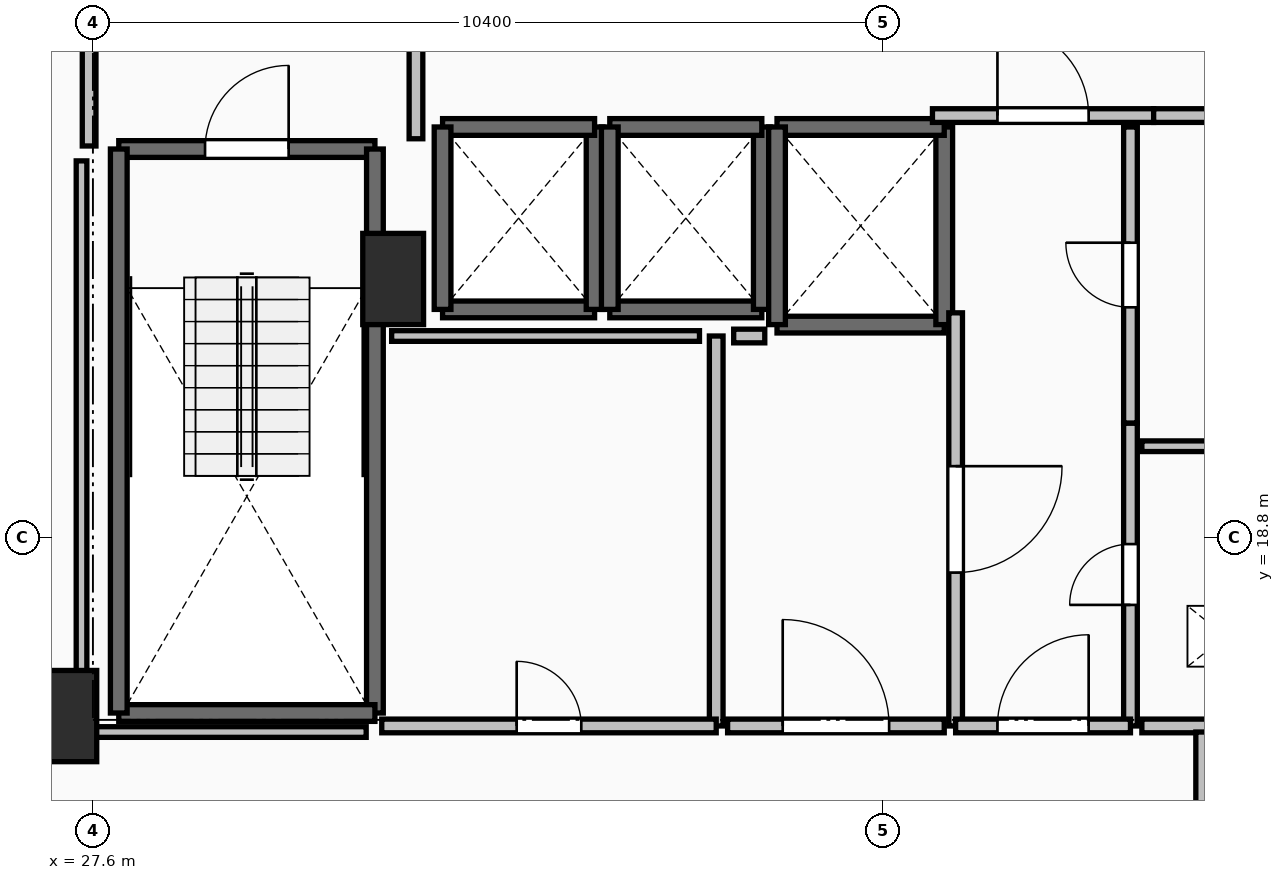
"""IFC4 building model, lengths in metres.
Left out: names, types, materials, properties, quantities, classifications, styles, units other than length and angle.
Written with IfcOpenShell. Run it as: python <this file> out.ifc"""

import sys

from ifc_helpers import new_model, si_unit, direction, frame, frame_2d, origin, origin_2d, place, context, subcontext, project, spatial, rectangle, extrude, element, fill, save


model = new_model("IFC4")
c1 = context("Model", 3, precision=1e-05, world=origin(), true_north=direction((0.0, 1.0)))
c2 = subcontext(c1, "Body", "Model", "MODEL_VIEW")
j1 = project(units=[si_unit("LENGTHUNIT", "METRE"), si_unit("PLANEANGLEUNIT", "RADIAN")], contexts=[c1])
p1 = place(None, origin())
s1 = spatial("IfcSite", under=j1, at=p1, CompositionType="ELEMENT")
p2 = place(p1, origin())
s2 = spatial("IfcBuilding", under=s1, at=p2, CompositionType="ELEMENT")
p3 = place(p2, frame((0.0, 0.0, 78.8)))
s3 = spatial("IfcBuildingStorey", under=s2, at=p3, CompositionType="ELEMENT", Elevation=78.8)
for number, where, z_axis, x_axis in (
    (1, (27.25, 16.45, 0.0), (0.0, 0.0, 1.0), (1.0, 0.0, 0.0)),
    (2, (31.55, 22.2, 0.0), (0.0, 0.0, 1.0), (1.0, 0.0, 0.0)),
):
    element("IfcColumn", number, at=place(p3, frame(where, z_axis=z_axis, x_axis=x_axis)), inside=s3, PredefinedType="PILASTER", context=c2, shape_type="SweptSolid", body=[
        extrude(rectangle(XDim=0.8, YDim=1.2, at=origin_2d()), origin(), (0.0, 0.0, 1.0), 3.5),
    ])
p4 = place(p3, frame((27.94, 23.91, 0.0), z_axis=(0.0, 0.0, 1.0), x_axis=(1.0, 0.0, 0.0)))
e3 = element("IfcWall", 3, at=p4, inside=s3, PredefinedType="SOLIDWALL", context=c2, shape_type="SweptSolid", body=[
    extrude(rectangle(XDim=3.37, YDim=0.22, at=frame_2d((1.685, 0.0))), origin(), (0.0, 0.0, 1.0), 3.24),
])
p5 = place(p4, frame((1.135, 0.0, 0.0)))
e4 = element("IfcOpeningElement", 4, at=p5, cuts=e3, PredefinedType="OPENING", context=c2, shape_type="SweptSolid", body=[
    extrude(rectangle(XDim=1.1, YDim=2.15, at=frame_2d((0.55, 1.075))), frame((0.0, 0.125, 0.0), z_axis=(0.0, -1.0, 0.0), x_axis=(1.0, 0.0, 0.0)), (0.0, 0.0, 1.0), 0.25),
])
p6 = place(p3, frame((31.31, 23.91, 0.0), z_axis=(0.0, 0.0, 1.0), x_axis=(0.0, -1.0, 0.0)))
e5 = element("IfcWall", 5, at=p6, inside=s3, PredefinedType="SOLIDWALL", context=c2, shape_type="SweptSolid", body=[
    extrude(rectangle(XDim=7.42, YDim=0.22, at=frame_2d((3.71, 0.0))), origin(), (0.0, 0.0, 1.0), 3.24),
])
p7 = place(p3, frame((31.31, 16.49, 0.0), z_axis=(0.0, 0.0, 1.0), x_axis=(-1.0, 0.0, 0.0)))
e6 = element("IfcWall", 6, at=p7, inside=s3, PredefinedType="SOLIDWALL", context=c2, shape_type="SweptSolid", body=[
    extrude(rectangle(XDim=3.37, YDim=0.22, at=frame_2d((1.685, 0.0))), origin(), (0.0, 0.0, 1.0), 3.24),
])
p8 = place(p3, frame((27.94, 16.49, 0.0), z_axis=(0.0, 0.0, 1.0), x_axis=(0.0, 1.0, 0.0)))
e7 = element("IfcWall", 7, at=p8, inside=s3, PredefinedType="SOLIDWALL", context=c2, shape_type="SweptSolid", body=[
    extrude(rectangle(XDim=7.42, YDim=0.22, at=frame_2d((3.71, 0.0))), origin(), (0.0, 0.0, 1.0), 3.24),
])
p9 = place(p3, frame((32.2, 21.8, 0.0), z_axis=(0.0, 0.0, 1.0), x_axis=(1.0, 0.0, 0.0)))
e8 = element("IfcWall", 8, at=p9, inside=s3, PredefinedType="SOLIDWALL", context=c2, shape_type="SweptSolid", body=[
    extrude(rectangle(XDim=2.0, YDim=0.22, at=frame_2d((1.0, 0.0))), origin(), (0.0, 0.0, 1.0), 3.24),
])
p10 = place(p3, frame((34.2, 21.8, 0.0), z_axis=(0.0, 0.0, 1.0), x_axis=(0.0, 1.0, 0.0)))
e9 = element("IfcWall", 9, at=p10, inside=s3, PredefinedType="SOLIDWALL", context=c2, shape_type="SweptSolid", body=[
    extrude(rectangle(XDim=2.4, YDim=0.22, at=frame_2d((1.2, 0.0))), origin(), (0.0, 0.0, 1.0), 3.24),
])
p11 = place(p3, frame((34.2, 24.2, 0.0), z_axis=(0.0, 0.0, 1.0), x_axis=(-1.0, 0.0, 0.0)))
e10 = element("IfcWall", 10, at=p11, inside=s3, PredefinedType="SOLIDWALL", context=c2, shape_type="SweptSolid", body=[
    extrude(rectangle(XDim=2.0, YDim=0.22, at=frame_2d((1.0, 0.0))), origin(), (0.0, 0.0, 1.0), 3.24),
])
p12 = place(p3, frame((32.2, 24.2, 0.0), z_axis=(0.0, 0.0, 1.0), x_axis=(0.0, -1.0, 0.0)))
e11 = element("IfcWall", 11, at=p12, inside=s3, PredefinedType="SOLIDWALL", context=c2, shape_type="SweptSolid", body=[
    extrude(rectangle(XDim=2.4, YDim=0.22, at=frame_2d((1.2, 0.0))), origin(), (0.0, 0.0, 1.0), 3.24),
])
p13 = place(p3, frame((34.4, 21.8, 0.0), z_axis=(0.0, 0.0, 1.0), x_axis=(1.0, 0.0, 0.0)))
e12 = element("IfcWall", 12, at=p13, inside=s3, PredefinedType="SOLIDWALL", context=c2, shape_type="SweptSolid", body=[
    extrude(rectangle(XDim=2.0, YDim=0.22, at=frame_2d((1.0, 0.0))), origin(), (0.0, 0.0, 1.0), 3.24),
])
p14 = place(p3, frame((36.4, 21.8, 0.0), z_axis=(0.0, 0.0, 1.0), x_axis=(0.0, 1.0, 0.0)))
e13 = element("IfcWall", 13, at=p14, inside=s3, PredefinedType="SOLIDWALL", context=c2, shape_type="SweptSolid", body=[
    extrude(rectangle(XDim=2.4, YDim=0.22, at=frame_2d((1.2, 0.0))), origin(), (0.0, 0.0, 1.0), 3.24),
])
p15 = place(p3, frame((36.4, 24.2, 0.0), z_axis=(0.0, 0.0, 1.0), x_axis=(-1.0, 0.0, 0.0)))
e14 = element("IfcWall", 14, at=p15, inside=s3, PredefinedType="SOLIDWALL", context=c2, shape_type="SweptSolid", body=[
    extrude(rectangle(XDim=2.0, YDim=0.22, at=frame_2d((1.0, 0.0))), origin(), (0.0, 0.0, 1.0), 3.24),
])
p16 = place(p3, frame((34.4, 24.2, 0.0), z_axis=(0.0, 0.0, 1.0), x_axis=(0.0, -1.0, 0.0)))
e15 = element("IfcWall", 15, at=p16, inside=s3, PredefinedType="SOLIDWALL", context=c2, shape_type="SweptSolid", body=[
    extrude(rectangle(XDim=2.4, YDim=0.22, at=frame_2d((1.2, 0.0))), origin(), (0.0, 0.0, 1.0), 3.24),
])
p17 = place(p3, frame((36.6, 21.6, 0.0), z_axis=(0.0, 0.0, 1.0), x_axis=(1.0, 0.0, 0.0)))
e16 = element("IfcWall", 16, at=p17, inside=s3, PredefinedType="SOLIDWALL", context=c2, shape_type="SweptSolid", body=[
    extrude(rectangle(XDim=2.2, YDim=0.22, at=frame_2d((1.1, 0.0))), origin(), (0.0, 0.0, 1.0), 3.24),
])
p18 = place(p3, frame((38.8, 21.6, 0.0), z_axis=(0.0, 0.0, 1.0), x_axis=(0.0, 1.0, 0.0)))
e17 = element("IfcWall", 17, at=p18, inside=s3, PredefinedType="SOLIDWALL", context=c2, shape_type="SweptSolid", body=[
    extrude(rectangle(XDim=2.6, YDim=0.22, at=frame_2d((1.3, 0.0))), origin(), (0.0, 0.0, 1.0), 3.24),
])
p19 = place(p3, frame((38.8, 24.2, 0.0), z_axis=(0.0, 0.0, 1.0), x_axis=(-1.0, 0.0, 0.0)))
e18 = element("IfcWall", 18, at=p19, inside=s3, PredefinedType="SOLIDWALL", context=c2, shape_type="SweptSolid", body=[
    extrude(rectangle(XDim=2.2, YDim=0.22, at=frame_2d((1.1, 0.0))), origin(), (0.0, 0.0, 1.0), 3.24),
])
p20 = place(p3, frame((36.6, 24.2, 0.0), z_axis=(0.0, 0.0, 1.0), x_axis=(0.0, -1.0, 0.0)))
e19 = element("IfcWall", 19, at=p20, inside=s3, PredefinedType="SOLIDWALL", context=c2, shape_type="SweptSolid", body=[
    extrude(rectangle(XDim=2.6, YDim=0.22, at=frame_2d((1.3, 0.0))), origin(), (0.0, 0.0, 1.0), 3.24),
])
p21 = place(p3, frame((31.85, 24.045, 0.0), z_axis=(0.0, 0.0, 1.0), x_axis=(0.0, 1.0, 0.0)))
e20 = element("IfcWall", 20, at=p21, inside=s3, PredefinedType="PARTITIONING", context=c2, shape_type="SweptSolid", body=[
    extrude(rectangle(XDim=3.91, YDim=0.18, at=frame_2d((1.955, 0.0))), origin(), (0.0, 0.0, 1.0), 3.24),
])
p22 = place(p21, frame((1.355, 0.0, 0.0)))
e21 = element("IfcOpeningElement", 21, at=p22, cuts=e20, PredefinedType="OPENING", context=c2, shape_type="SweptSolid", body=[
    extrude(rectangle(XDim=1.2, YDim=2.15, at=frame_2d((0.6, 1.075))), frame((0.0, 0.105, 0.0), z_axis=(0.0, -1.0, 0.0), x_axis=(1.0, 0.0, 0.0)), (0.0, 0.0, 1.0), 0.21),
])
p23 = place(p3, frame((27.55, 28.0, 0.0), z_axis=(0.0, 0.0, 1.0), x_axis=(0.0, -1.0, 0.0)))
e22 = element("IfcWall", 22, at=p23, inside=s3, PredefinedType="PARTITIONING", context=c2, shape_type="SweptSolid", body=[
    extrude(rectangle(XDim=4.05, YDim=0.18, at=frame_2d((2.025, 0.0))), origin(), (0.0, 0.0, 1.0), 3.24),
])
p24 = place(p23, frame((1.425, 0.0, 0.0)))
e23 = element("IfcOpeningElement", 23, at=p24, cuts=e22, PredefinedType="OPENING", context=c2, shape_type="SweptSolid", body=[
    extrude(rectangle(XDim=1.2, YDim=2.15, at=frame_2d((0.6, 1.075))), frame((0.0, 0.105, 0.0), z_axis=(0.0, -1.0, 0.0), x_axis=(1.0, 0.0, 0.0)), (0.0, 0.0, 1.0), 0.21),
])
p25 = place(p3, frame((38.645, 24.35, 0.0), z_axis=(0.0, 0.0, 1.0), x_axis=(1.0, 0.0, 0.0)))
e24 = element("IfcWall", 24, at=p25, inside=s3, PredefinedType="PARTITIONING", context=c2, shape_type="SweptSolid", body=[
    extrude(rectangle(XDim=2.91, YDim=0.18, at=frame_2d((1.455, 0.0))), origin(), (0.0, 0.0, 1.0), 3.24),
])
p26 = place(p25, frame((0.855, 0.0, 0.0)))
e25 = element("IfcOpeningElement", 25, at=p26, cuts=e24, PredefinedType="OPENING", context=c2, shape_type="SweptSolid", body=[
    extrude(rectangle(XDim=1.2, YDim=2.15, at=frame_2d((0.6, 1.075))), frame((0.0, 0.105, 0.0), z_axis=(0.0, -1.0, 0.0), x_axis=(1.0, 0.0, 0.0)), (0.0, 0.0, 1.0), 0.21),
])
p27 = place(p3, frame((41.555, 24.35, 0.0), z_axis=(0.0, 0.0, 1.0), x_axis=(1.0, 0.0, 0.0)))
e26 = element("IfcWall", 26, at=p27, inside=s3, PredefinedType="PARTITIONING", context=c2, shape_type="SweptSolid", body=[
    extrude(rectangle(XDim=2.445, YDim=0.18, at=frame_2d((1.223, 0.0))), origin(), (0.0, 0.0, 1.0), 3.24),
])
p28 = place(p27, frame((0.798, 0.0, 0.0)))
e27 = element("IfcOpeningElement", 27, at=p28, cuts=e26, PredefinedType="OPENING", context=c2, shape_type="SweptSolid", body=[
    extrude(rectangle(XDim=0.85, YDim=2.1, at=frame_2d((0.425, 1.05))), frame((0.0, 0.105, 0.0), z_axis=(0.0, -1.0, 0.0), x_axis=(1.0, 0.0, 0.0)), (0.0, 0.0, 1.0), 0.21),
])
p29 = place(p3, frame((41.25, 16.32, 0.0), z_axis=(0.0, 0.0, 1.0), x_axis=(0.0, 1.0, 0.0)))
e28 = element("IfcWall", 28, at=p29, inside=s3, PredefinedType="PARTITIONING", context=c2, shape_type="SweptSolid", body=[
    extrude(rectangle(XDim=3.985, YDim=0.18, at=frame_2d((1.992, 0.0))), origin(), (0.0, 0.0, 1.0), 3.24),
])
p30 = place(p29, frame((1.593, 0.0, 0.0)))
e29 = element("IfcOpeningElement", 29, at=p30, cuts=e28, PredefinedType="OPENING", context=c2, shape_type="SweptSolid", body=[
    extrude(rectangle(XDim=0.8, YDim=2.05, at=frame_2d((0.4, 1.025))), frame((0.0, 0.105, 0.0), z_axis=(0.0, -1.0, 0.0), x_axis=(1.0, 0.0, 0.0)), (0.0, 0.0, 1.0), 0.21),
])
p31 = place(p3, frame((41.25, 20.305, 0.0), z_axis=(0.0, 0.0, 1.0), x_axis=(0.0, 1.0, 0.0)))
e30 = element("IfcWall", 30, at=p31, inside=s3, PredefinedType="PARTITIONING", context=c2, shape_type="SweptSolid", body=[
    extrude(rectangle(XDim=3.895, YDim=0.18, at=frame_2d((1.948, 0.0))), origin(), (0.0, 0.0, 1.0), 3.24),
])
p32 = place(p31, frame((1.522, 0.0, 0.0)))
e31 = element("IfcOpeningElement", 31, at=p32, cuts=e30, PredefinedType="OPENING", context=c2, shape_type="SweptSolid", body=[
    extrude(rectangle(XDim=0.85, YDim=2.1, at=frame_2d((0.425, 1.05))), frame((0.0, 0.105, 0.0), z_axis=(0.0, -1.0, 0.0), x_axis=(1.0, 0.0, 0.0)), (0.0, 0.0, 1.0), 0.21),
])
p33 = place(p3, frame((38.95, 21.755, 0.0), z_axis=(0.0, 0.0, 1.0), x_axis=(0.0, -1.0, 0.0)))
e32 = element("IfcWall", 32, at=p33, inside=s3, PredefinedType="PARTITIONING", context=c2, shape_type="SweptSolid", body=[
    extrude(rectangle(XDim=5.435, YDim=0.18, at=frame_2d((2.717, 0.0))), origin(), (0.0, 0.0, 1.0), 3.24),
])
p34 = place(p33, frame((2.018, 0.0, 0.0)))
e33 = element("IfcOpeningElement", 33, at=p34, cuts=e32, PredefinedType="OPENING", context=c2, shape_type="SweptSolid", body=[
    extrude(rectangle(XDim=1.4, YDim=2.2, at=frame_2d((0.7, 1.1))), frame((0.0, 0.105, 0.0), z_axis=(0.0, -1.0, 0.0), x_axis=(1.0, 0.0, 0.0)), (0.0, 0.0, 1.0), 0.21),
])
p35 = place(p3, frame((38.95, 16.32, 0.0), z_axis=(0.0, 0.0, 1.0), x_axis=(1.0, 0.0, 0.0)))
e34 = element("IfcWall", 34, at=p35, inside=s3, PredefinedType="PARTITIONING", context=c2, shape_type="SweptSolid", body=[
    extrude(rectangle(XDim=2.3, YDim=0.18, at=frame_2d((1.15, 0.0))), origin(), (0.0, 0.0, 1.0), 3.24),
])
p36 = place(p35, frame((0.55, 0.0, 0.0)))
e35 = element("IfcOpeningElement", 35, at=p36, cuts=e34, PredefinedType="OPENING", context=c2, shape_type="SweptSolid", body=[
    extrude(rectangle(XDim=1.2, YDim=2.15, at=frame_2d((0.6, 1.075))), frame((0.0, 0.105, 0.0), z_axis=(0.0, -1.0, 0.0), x_axis=(1.0, 0.0, 0.0)), (0.0, 0.0, 1.0), 0.21),
])
p37 = place(p3, frame((44.6, 20.0, 0.0), z_axis=(0.0, 0.0, 1.0), x_axis=(-1.0, 0.0, 0.0)))
e36 = element("IfcWall", 36, at=p37, inside=s3, PredefinedType="PARTITIONING", context=c2, shape_type="SweptSolid", body=[
    extrude(rectangle(XDim=3.2, YDim=0.14, at=frame_2d((1.6, 0.0))), origin(), (0.0, 0.0, 1.0), 3.24),
])
p38 = place(p3, frame((41.4, 16.32, 0.0), z_axis=(0.0, 0.0, 1.0), x_axis=(1.0, 0.0, 0.0)))
e37 = element("IfcWall", 37, at=p38, inside=s3, PredefinedType="PARTITIONING", context=c2, shape_type="SweptSolid", body=[
    extrude(rectangle(XDim=3.2, YDim=0.18, at=frame_2d((1.6, 0.0))), origin(), (0.0, 0.0, 1.0), 3.24),
])
p39 = place(p38, frame((1.2, 0.0, 0.0)))
e38 = element("IfcOpeningElement", 38, at=p39, cuts=e37, PredefinedType="OPENING", context=c2, shape_type="SweptSolid", body=[
    extrude(rectangle(XDim=0.8, YDim=2.05, at=frame_2d((0.4, 1.025))), frame((0.0, 0.105, 0.0), z_axis=(0.0, -1.0, 0.0), x_axis=(1.0, 0.0, 0.0)), (0.0, 0.0, 1.0), 0.21),
])
p40 = place(p3, frame((35.8, 16.32, 0.0), z_axis=(0.0, 0.0, 1.0), x_axis=(0.0, 1.0, 0.0)))
e39 = element("IfcWall", 39, at=p40, inside=s3, PredefinedType="PARTITIONING", context=c2, shape_type="SweptSolid", body=[
    extrude(rectangle(XDim=5.13, YDim=0.18, at=frame_2d((2.565, 0.0))), origin(), (0.0, 0.0, 1.0), 3.24),
])
p41 = place(p3, frame((31.4, 16.32, 0.0), z_axis=(0.0, 0.0, 1.0), x_axis=(1.0, 0.0, 0.0)))
e40 = element("IfcWall", 40, at=p41, inside=s3, PredefinedType="PARTITIONING", context=c2, shape_type="SweptSolid", body=[
    extrude(rectangle(XDim=4.4, YDim=0.18, at=frame_2d((2.2, 0.0))), origin(), (0.0, 0.0, 1.0), 3.24),
])
p42 = place(p41, frame((1.775, 0.0, 0.0)))
e41 = element("IfcOpeningElement", 41, at=p42, cuts=e40, PredefinedType="OPENING", context=c2, shape_type="SweptSolid", body=[
    extrude(rectangle(XDim=0.85, YDim=2.1, at=frame_2d((0.425, 1.05))), frame((0.0, 0.105, 0.0), z_axis=(0.0, -1.0, 0.0), x_axis=(1.0, 0.0, 0.0)), (0.0, 0.0, 1.0), 0.21),
])
p43 = place(p3, frame((35.95, 16.32, 0.0), z_axis=(0.0, 0.0, 1.0), x_axis=(1.0, 0.0, 0.0)))
e42 = element("IfcWall", 42, at=p43, inside=s3, PredefinedType="PARTITIONING", context=c2, shape_type="SweptSolid", body=[
    extrude(rectangle(XDim=2.85, YDim=0.18, at=frame_2d((1.425, 0.0))), origin(), (0.0, 0.0, 1.0), 3.24),
])
p44 = place(p43, frame((0.725, 0.0, 0.0)))
e43 = element("IfcOpeningElement", 43, at=p44, cuts=e42, PredefinedType="OPENING", context=c2, shape_type="SweptSolid", body=[
    extrude(rectangle(XDim=1.4, YDim=2.2, at=frame_2d((0.7, 1.1))), frame((0.0, 0.105, 0.0), z_axis=(0.0, -1.0, 0.0), x_axis=(1.0, 0.0, 0.0)), (0.0, 0.0, 1.0), 0.21),
])
p45 = place(p3, frame((42.2, 14.1, 0.0), z_axis=(0.0, 0.0, 1.0), x_axis=(0.0, 1.0, 0.0)))
e44 = element("IfcWall", 44, at=p45, inside=s3, PredefinedType="PARTITIONING", context=c2, shape_type="SweptSolid", body=[
    extrude(rectangle(XDim=2.14, YDim=0.18, at=frame_2d((1.07, 0.0))), origin(), (0.0, 0.0, 1.0), 2.922),
])
p46 = place(p3, frame((35.58, 21.45, 0.0), z_axis=(0.0, 0.0, 1.0), x_axis=(-1.0, 0.0, 0.0)))
e45 = element("IfcWall", 45, at=p46, inside=s3, PredefinedType="PARTITIONING", context=c2, shape_type="SweptSolid", body=[
    extrude(rectangle(XDim=4.05, YDim=0.14, at=frame_2d((2.025, 0.0))), origin(), (0.0, 0.0, 1.0), 3.24),
])
p47 = place(p3, frame((36.439, 21.45, 0.0), z_axis=(0.0, 0.0, 1.0), x_axis=(-1.0, 0.0, 0.0)))
e46 = element("IfcWall", 46, at=p47, inside=s3, PredefinedType="PARTITIONING", context=c2, shape_type="SweptSolid", body=[
    extrude(rectangle(XDim=0.409, YDim=0.18, at=frame_2d((0.205, 0.0))), origin(), (0.0, 0.0, 1.0), 3.24),
])
p48 = place(p3, frame((31.195, 16.24, 0.0), z_axis=(0.0, 0.0, 1.0), x_axis=(-1.0, 0.0, 0.0)))
e47 = element("IfcWall", 47, at=p48, inside=s3, PredefinedType="PARTITIONING", context=c2, shape_type="SweptSolid", body=[
    extrude(rectangle(XDim=3.745, YDim=0.14, at=frame_2d((1.873, 0.0))), origin(), (0.0, 0.0, 1.0), 2.432),
])
p49 = place(p3, frame((27.45, 16.24, 0.0), z_axis=(0.0, 0.0, 1.0), x_axis=(0.0, 1.0, 0.0)))
e48 = element("IfcWall", 48, at=p49, inside=s3, PredefinedType="PARTITIONING", context=c2, shape_type="SweptSolid", body=[
    extrude(rectangle(XDim=7.514, YDim=0.14, at=frame_2d((3.757, 0.0))), origin(), (0.0, 0.0, 1.0), 2.432),
])
p50 = place(p5, origin())
e49 = element("IfcDoor", 49, at=p50, inside=s3, OperationType="SINGLE_SWING_RIGHT", PredefinedType="DOOR", context=c2, shape_type="SweptSolid", body=[
    extrude(rectangle(XDim=1.1, YDim=2.15, at=frame_2d((0.55, 1.075))), frame((0.0, 0.025, 0.0), z_axis=(0.0, -1.0, 0.0), x_axis=(1.0, 0.0, 0.0)), (0.0, 0.0, 1.0), 0.05),
])
fill(e4, e49)
p51 = place(p26, origin())
e50 = element("IfcDoor", 50, at=p51, inside=s3, OperationType="SINGLE_SWING_LEFT", PredefinedType="DOOR", context=c2, shape_type="SweptSolid", body=[
    extrude(rectangle(XDim=1.2, YDim=2.15, at=frame_2d((0.6, 1.075))), frame((0.0, 0.025, 0.0), z_axis=(0.0, -1.0, 0.0), x_axis=(1.0, 0.0, 0.0)), (0.0, 0.0, 1.0), 0.05),
])
fill(e25, e50)
p52 = place(p30, origin())
e51 = element("IfcDoor", 51, at=p52, inside=s3, OperationType="SINGLE_SWING_LEFT", PredefinedType="DOOR", context=c2, shape_type="SweptSolid", body=[
    extrude(rectangle(XDim=0.8, YDim=2.05, at=frame_2d((0.4, 1.025))), frame((0.0, 0.025, 0.0), z_axis=(0.0, -1.0, 0.0), x_axis=(1.0, 0.0, 0.0)), (0.0, 0.0, 1.0), 0.05),
])
fill(e29, e51)
p53 = place(p32, origin())
e52 = element("IfcDoor", 52, at=p53, inside=s3, OperationType="SINGLE_SWING_RIGHT", PredefinedType="DOOR", context=c2, shape_type="SweptSolid", body=[
    extrude(rectangle(XDim=0.85, YDim=2.1, at=frame_2d((0.425, 1.05))), frame((0.0, 0.025, 0.0), z_axis=(0.0, -1.0, 0.0), x_axis=(1.0, 0.0, 0.0)), (0.0, 0.0, 1.0), 0.05),
])
fill(e31, e52)
p54 = place(p34, origin())
e53 = element("IfcDoor", 53, at=p54, inside=s3, OperationType="DOUBLE_SWING_LEFT", PredefinedType="DOOR", context=c2, shape_type="SweptSolid", body=[
    extrude(rectangle(XDim=1.4, YDim=2.2, at=frame_2d((0.7, 1.1))), frame((0.0, 0.025, 0.0), z_axis=(0.0, -1.0, 0.0), x_axis=(1.0, 0.0, 0.0)), (0.0, 0.0, 1.0), 0.05),
])
fill(e33, e53)
p55 = place(p36, origin())
e54 = element("IfcDoor", 54, at=p55, inside=s3, OperationType="SINGLE_SWING_RIGHT", PredefinedType="DOOR", context=c2, shape_type="SweptSolid", body=[
    extrude(rectangle(XDim=1.2, YDim=2.15, at=frame_2d((0.6, 1.075))), frame((0.0, 0.025, 0.0), z_axis=(0.0, -1.0, 0.0), x_axis=(1.0, 0.0, 0.0)), (0.0, 0.0, 1.0), 0.05),
])
fill(e35, e54)
p56 = place(p42, origin())
e55 = element("IfcDoor", 55, at=p56, inside=s3, OperationType="SINGLE_SWING_LEFT", PredefinedType="DOOR", context=c2, shape_type="SweptSolid", body=[
    extrude(rectangle(XDim=0.85, YDim=2.1, at=frame_2d((0.425, 1.05))), frame((0.0, 0.025, 0.0), z_axis=(0.0, -1.0, 0.0), x_axis=(1.0, 0.0, 0.0)), (0.0, 0.0, 1.0), 0.05),
])
fill(e41, e55)
p57 = place(p44, origin())
e56 = element("IfcDoor", 56, at=p57, inside=s3, OperationType="DOUBLE_SWING_LEFT", PredefinedType="DOOR", context=c2, shape_type="SweptSolid", body=[
    extrude(rectangle(XDim=1.4, YDim=2.2, at=frame_2d((0.7, 1.1))), frame((0.0, 0.025, 0.0), z_axis=(0.0, -1.0, 0.0), x_axis=(1.0, 0.0, 0.0)), (0.0, 0.0, 1.0), 0.05),
])
fill(e43, e56)
save(model, sys.argv[1])
